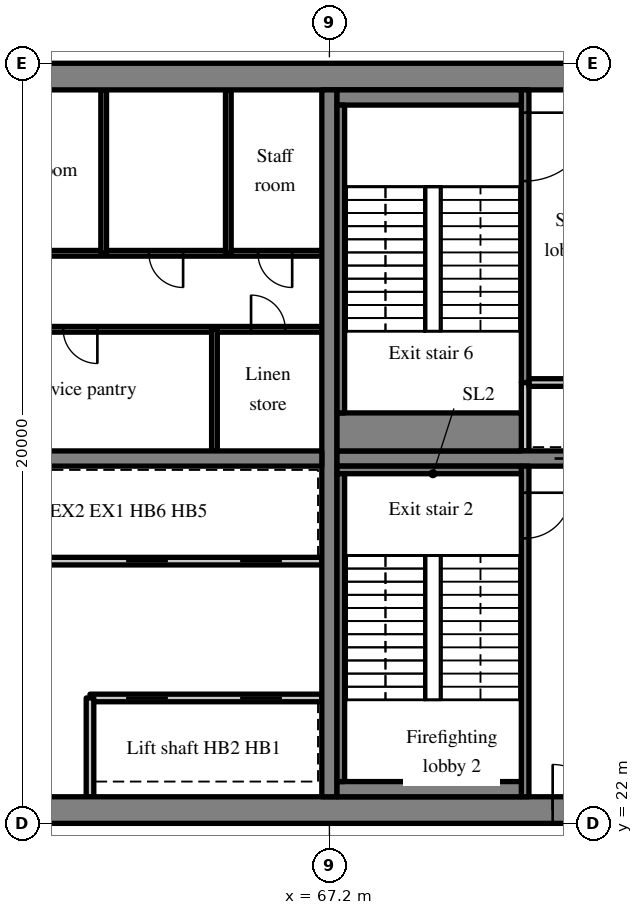
"""IFC4 building model, lengths in metres.
Left out: names, types, materials, properties, quantities, classifications, styles, units other than length and angle.
Written with IfcOpenShell. Run it as: python <this file> out.ifc"""

import sys

from ifc_helpers import new_model, si_unit, direction, frame, frame_2d, origin, place, context, subcontext, project, spatial, rectangle, extrude, source, transform, mapped, element, fill, save


model = new_model("IFC4")
c1 = context("Model", 3, precision=1e-05, world=origin(), true_north=direction((0.0, 1.0)))
c2 = subcontext(c1, "Body", "Model", "MODEL_VIEW")
j1 = project(units=[si_unit("LENGTHUNIT", "METRE"), si_unit("PLANEANGLEUNIT", "RADIAN")], contexts=[c1])
p1 = place(None, origin())
s1 = spatial("IfcSite", under=j1, at=p1, CompositionType="ELEMENT")
p2 = place(p1, origin())
s2 = spatial("IfcBuilding", under=s1, at=p2, CompositionType="ELEMENT")
p3 = place(p2, frame((0.0, 0.0, 166.8)))
s3 = spatial("IfcBuildingStorey", under=s2, at=p3, CompositionType="ELEMENT", Elevation=166.8)
m1 = source(origin(), c2, "Body", "SweptSolid", [
    extrude(rectangle(XDim=50.4, YDim=0.7, at=frame_2d((25.2, 0.0))), origin(), (0.0, 0.0, 1.0), 3.52),
])
p4 = place(p3, frame((25.2, 22.35, 0.0), z_axis=(0.0, 0.0, 1.0), x_axis=(1.0, 0.0, 0.0)))
e1 = element("IfcWall", 1, at=p4, inside=s3, PredefinedType="SHEAR", context=c2, shape_type="MappedRepresentation", body=[
    mapped(m1, transform((0.0, 0.0, 0.0), scale=1.0)),
])
m2 = source(origin(), c2, "Body", "SweptSolid", [
    extrude(rectangle(XDim=1.8, YDim=2.1, at=frame_2d((0.9, 1.05))), frame((0.0, 0.36, 0.0), z_axis=(0.0, -1.0, 0.0), x_axis=(1.0, 0.0, 0.0)), (0.0, 0.0, 1.0), 0.72),
])
p5 = place(p4, frame((15.9, 0.0, 0.0)))
e2 = element("IfcOpeningElement", 2, at=p5, cuts=e1, PredefinedType="OPENING", context=c2, shape_type="MappedRepresentation", body=[
    mapped(m2, transform((0.0, 0.0, 0.0), scale=1.0)),
])
m3 = source(origin(), c2, "Body", "SweptSolid", [
    extrude(rectangle(XDim=0.9, YDim=2.1, at=frame_2d((0.45, 1.05))), frame((0.0, 0.36, 0.0), z_axis=(0.0, -1.0, 0.0), x_axis=(1.0, 0.0, 0.0)), (0.0, 0.0, 1.0), 0.72),
])
p6 = place(p4, frame((9.7, 0.0, 0.0)))
e3 = element("IfcOpeningElement", 3, at=p6, cuts=e1, PredefinedType="OPENING", context=c2, shape_type="MappedRepresentation", body=[
    mapped(m3, transform((0.0, 0.0, 0.0), scale=1.0)),
])
p7 = place(p4, frame((21.5, 0.0, 0.0)))
e4 = element("IfcOpeningElement", 4, at=p7, cuts=e1, PredefinedType="OPENING", context=c2, shape_type="MappedRepresentation", body=[
    mapped(m3, transform((0.0, 0.0, 0.0), scale=1.0)),
])
p8 = place(p4, frame((32.7, 0.0, 0.0)))
e5 = element("IfcOpeningElement", 5, at=p8, cuts=e1, PredefinedType="OPENING", context=c2, shape_type="MappedRepresentation", body=[
    mapped(m2, transform((0.0, 0.0, 0.0), scale=1.0)),
])
m4 = source(origin(), c2, "Body", "SweptSolid", [
    extrude(rectangle(XDim=1.2, YDim=2.1, at=frame_2d((0.6, 1.05))), frame((0.0, 0.36, 0.0), z_axis=(0.0, -1.0, 0.0), x_axis=(1.0, 0.0, 0.0)), (0.0, 0.0, 1.0), 0.72),
])
p9 = place(p4, frame((6.475, 0.0, 0.0)))
e6 = element("IfcOpeningElement", 6, at=p9, cuts=e1, PredefinedType="OPENING", context=c2, shape_type="MappedRepresentation", body=[
    mapped(m4, transform((0.0, 0.0, 0.0), scale=1.0)),
])
p10 = place(p4, frame((47.875, 0.0, 0.0)))
e7 = element("IfcOpeningElement", 7, at=p10, cuts=e1, PredefinedType="OPENING", context=c2, shape_type="MappedRepresentation", body=[
    mapped(m4, transform((0.0, 0.0, 0.0), scale=1.0)),
])
p11 = place(p3, frame((25.2, 41.65, 0.0), z_axis=(0.0, 0.0, 1.0), x_axis=(1.0, 0.0, 0.0)))
e8 = element("IfcWall", 8, at=p11, inside=s3, PredefinedType="SHEAR", context=c2, shape_type="MappedRepresentation", body=[
    mapped(m1, transform((0.0, 0.0, 0.0), scale=1.0)),
])
m5 = source(origin(), c2, "Body", "SweptSolid", [
    extrude(rectangle(XDim=18.6, YDim=0.4, at=frame_2d((9.3, 0.0))), origin(), (0.0, 0.0, 1.0), 3.52),
])
p12 = place(p3, frame((67.2, 22.7, 0.0), z_axis=(0.0, 0.0, 1.0), x_axis=(0.0, 1.0, 0.0)))
e9 = element("IfcWall", 9, at=p12, inside=s3, PredefinedType="SHEAR", context=c2, shape_type="MappedRepresentation", body=[
    mapped(m5, transform((0.0, 0.0, 0.0), scale=1.0)),
])
m6 = source(origin(), c2, "Body", "SweptSolid", [
    extrude(rectangle(XDim=16.4, YDim=0.4, at=frame_2d((8.2, 0.0))), origin(), (0.0, 0.0, 1.0), 3.52),
])
p13 = place(p3, frame((50.6, 31.6, 0.0), z_axis=(0.0, 0.0, 1.0), x_axis=(1.0, 0.0, 0.0)))
e10 = element("IfcWall", 10, at=p13, inside=s3, PredefinedType="SHEAR", context=c2, shape_type="MappedRepresentation", body=[
    mapped(m6, transform((0.0, 0.0, 0.0), scale=1.0)),
])
m7 = source(origin(), c2, "Body", "SweptSolid", [
    extrude(rectangle(XDim=1.0, YDim=2.1, at=frame_2d((0.5, 1.05))), frame((0.0, 0.21, 0.0), z_axis=(0.0, -1.0, 0.0), x_axis=(1.0, 0.0, 0.0)), (0.0, 0.0, 1.0), 0.42),
])
p14 = place(p13, frame((0.6, 0.0, 0.0)))
e11 = element("IfcOpeningElement", 11, at=p14, cuts=e10, PredefinedType="OPENING", context=c2, shape_type="MappedRepresentation", body=[
    mapped(m7, transform((0.0, 0.0, 0.0), scale=1.0)),
])
m8 = source(origin(), c2, "Body", "SweptSolid", [
    extrude(rectangle(XDim=7.5, YDim=0.4, at=frame_2d((3.75, 0.0))), origin(), (0.0, 0.0, 1.0), 3.52),
])
p15 = place(p3, frame((67.4, 31.6, 0.0), z_axis=(0.0, 0.0, 1.0), x_axis=(1.0, 0.0, 0.0)))
e12 = element("IfcWall", 12, at=p15, inside=s3, PredefinedType="SHEAR", context=c2, shape_type="MappedRepresentation", body=[
    mapped(m8, transform((0.0, 0.0, 0.0), scale=1.0)),
])
m9 = source(origin(), c2, "Body", "SweptSolid", [
    extrude(rectangle(XDim=1.1, YDim=2.1, at=frame_2d((0.55, 1.05))), frame((0.0, 0.21, 0.0), z_axis=(0.0, -1.0, 0.0), x_axis=(1.0, 0.0, 0.0)), (0.0, 0.0, 1.0), 0.42),
])
p16 = place(p15, frame((5.725, 0.0, 0.0)))
e13 = element("IfcOpeningElement", 13, at=p16, cuts=e12, PredefinedType="OPENING", context=c2, shape_type="MappedRepresentation", body=[
    mapped(m9, transform((0.0, 0.0, 0.0), scale=1.0)),
])
m10 = source(origin(), c2, "Body", "SweptSolid", [
    extrude(rectangle(XDim=6.1, YDim=0.2, at=frame_2d((3.05, 0.0))), origin(), (0.0, 0.0, 1.0), 3.52),
])
p17 = place(p3, frame((67.0, 25.3, 0.0), z_axis=(0.0, 0.0, 1.0), x_axis=(-1.0, 0.0, 0.0)))
e14 = element("IfcWall", 14, at=p17, inside=s3, PredefinedType="SOLIDWALL", context=c2, shape_type="MappedRepresentation", body=[
    mapped(m10, transform((0.0, 0.0, 0.0), scale=1.0)),
])
m11 = source(origin(), c2, "Body", "SweptSolid", [
    extrude(rectangle(XDim=1.1, YDim=2.1, at=frame_2d((0.55, 1.05))), frame((0.0, 0.11, 0.0), z_axis=(0.0, -1.0, 0.0), x_axis=(1.0, 0.0, 0.0)), (0.0, 0.0, 1.0), 0.22),
])
p18 = place(p17, frame((1.05, 0.0, 0.0)))
e15 = element("IfcOpeningElement", 15, at=p18, cuts=e14, PredefinedType="OPENING", context=c2, shape_type="MappedRepresentation", body=[
    mapped(m11, transform((0.0, 0.0, 0.0), scale=1.0)),
])
p19 = place(p17, frame((4.05, 0.0, 0.0)))
e16 = element("IfcOpeningElement", 16, at=p19, cuts=e14, PredefinedType="OPENING", context=c2, shape_type="MappedRepresentation", body=[
    mapped(m11, transform((0.0, 0.0, 0.0), scale=1.0)),
])
m12 = source(origin(), c2, "Body", "SweptSolid", [
    extrude(rectangle(XDim=12.1, YDim=0.2, at=frame_2d((6.05, 0.0))), origin(), (0.0, 0.0, 1.0), 3.52),
])
p20 = place(p3, frame((67.0, 28.9, 0.0), z_axis=(0.0, 0.0, 1.0), x_axis=(-1.0, 0.0, 0.0)))
e17 = element("IfcWall", 17, at=p20, inside=s3, PredefinedType="SOLIDWALL", context=c2, shape_type="MappedRepresentation", body=[
    mapped(m12, transform((0.0, 0.0, 0.0), scale=1.0)),
])
p21 = place(p20, frame((1.05, 0.0, 0.0)))
e18 = element("IfcOpeningElement", 18, at=p21, cuts=e17, PredefinedType="OPENING", context=c2, shape_type="MappedRepresentation", body=[
    mapped(m11, transform((0.0, 0.0, 0.0), scale=1.0)),
])
p22 = place(p20, frame((4.05, 0.0, 0.0)))
e19 = element("IfcOpeningElement", 19, at=p22, cuts=e17, PredefinedType="OPENING", context=c2, shape_type="MappedRepresentation", body=[
    mapped(m11, transform((0.0, 0.0, 0.0), scale=1.0)),
])
m13 = source(origin(), c2, "Body", "SweptSolid", [
    extrude(rectangle(XDim=2.6, YDim=0.2, at=frame_2d((1.3, 0.0))), origin(), (0.0, 0.0, 1.0), 3.52),
])
p23 = place(p3, frame((60.9, 22.7, 0.0), z_axis=(0.0, 0.0, 1.0), x_axis=(0.0, 1.0, 0.0)))
e20 = element("IfcWall", 20, at=p23, inside=s3, PredefinedType="SOLIDWALL", context=c2, shape_type="MappedRepresentation", body=[
    mapped(m13, transform((0.0, 0.0, 0.0), scale=1.0)),
])
m14 = source(origin(), c2, "Body", "SweptSolid", [
    extrude(rectangle(XDim=14.2, YDim=0.15, at=frame_2d((7.1, 0.0))), origin(), (0.0, 0.0, 1.0), 3.52),
])
p24 = place(p3, frame((67.0, 35.0, 0.0), z_axis=(0.0, 0.0, 1.0), x_axis=(-1.0, 0.0, 0.0)))
e21 = element("IfcWall", 21, at=p24, inside=s3, PredefinedType="PARTITIONING", context=c2, shape_type="MappedRepresentation", body=[
    mapped(m14, transform((0.0, 0.0, 0.0), scale=1.0)),
])
m15 = source(origin(), c2, "Body", "SweptSolid", [
    extrude(rectangle(XDim=0.9, YDim=2.1, at=frame_2d((0.45, 1.05))), frame((0.0, 0.085, 0.0), z_axis=(0.0, -1.0, 0.0), x_axis=(1.0, 0.0, 0.0)), (0.0, 0.0, 1.0), 0.17),
])
p25 = place(p24, frame((0.962, 0.0, 0.0)))
e22 = element("IfcOpeningElement", 22, at=p25, cuts=e21, PredefinedType="OPENING", context=c2, shape_type="MappedRepresentation", body=[
    mapped(m15, transform((0.0, 0.0, 0.0), scale=1.0)),
])
p26 = place(p24, frame((5.906, 0.0, 0.0)))
e23 = element("IfcOpeningElement", 23, at=p26, cuts=e21, PredefinedType="OPENING", context=c2, shape_type="MappedRepresentation", body=[
    mapped(m15, transform((0.0, 0.0, 0.0), scale=1.0)),
])
p27 = place(p24, frame((11.556, 0.0, 0.0)))
e24 = element("IfcOpeningElement", 24, at=p27, cuts=e21, PredefinedType="OPENING", context=c2, shape_type="MappedRepresentation", body=[
    mapped(m15, transform((0.0, 0.0, 0.0), scale=1.0)),
])
m16 = source(origin(), c2, "Body", "SweptSolid", [
    extrude(rectangle(XDim=16.4, YDim=0.15, at=frame_2d((8.2, 0.0))), origin(), (0.0, 0.0, 1.0), 3.52),
])
p28 = place(p3, frame((67.0, 37.0, 0.0), z_axis=(0.0, 0.0, 1.0), x_axis=(-1.0, 0.0, 0.0)))
e25 = element("IfcWall", 25, at=p28, inside=s3, PredefinedType="PARTITIONING", context=c2, shape_type="MappedRepresentation", body=[
    mapped(m16, transform((0.0, 0.0, 0.0), scale=1.0)),
])
p29 = place(p28, frame((0.78, 0.0, 0.0)))
e26 = element("IfcOpeningElement", 26, at=p29, cuts=e25, PredefinedType="OPENING", context=c2, shape_type="MappedRepresentation", body=[
    mapped(m15, transform((0.0, 0.0, 0.0), scale=1.0)),
])
p30 = place(p28, frame((3.65, 0.0, 0.0)))
e27 = element("IfcOpeningElement", 27, at=p30, cuts=e25, PredefinedType="OPENING", context=c2, shape_type="MappedRepresentation", body=[
    mapped(m15, transform((0.0, 0.0, 0.0), scale=1.0)),
])
p31 = place(p28, frame((9.39, 0.0, 0.0)))
e28 = element("IfcOpeningElement", 28, at=p31, cuts=e25, PredefinedType="OPENING", context=c2, shape_type="MappedRepresentation", body=[
    mapped(m15, transform((0.0, 0.0, 0.0), scale=1.0)),
])
p32 = place(p28, frame((14.72, 0.0, 0.0)))
e29 = element("IfcOpeningElement", 29, at=p32, cuts=e25, PredefinedType="OPENING", context=c2, shape_type="MappedRepresentation", body=[
    mapped(m15, transform((0.0, 0.0, 0.0), scale=1.0)),
])
m17 = source(origin(), c2, "Body", "SweptSolid", [
    extrude(rectangle(XDim=3.2, YDim=0.15, at=frame_2d((1.6, 0.0))), origin(), (0.0, 0.0, 1.0), 3.52),
])
p33 = place(p3, frame((64.175, 31.8, 0.0), z_axis=(0.0, 0.0, 1.0), x_axis=(0.0, 1.0, 0.0)))
e30 = element("IfcWall", 30, at=p33, inside=s3, PredefinedType="PARTITIONING", context=c2, shape_type="MappedRepresentation", body=[
    mapped(m17, transform((0.0, 0.0, 0.0), scale=1.0)),
])
m18 = source(origin(), c2, "Body", "SweptSolid", [
    extrude(rectangle(XDim=4.3, YDim=0.15, at=frame_2d((2.15, 0.0))), origin(), (0.0, 0.0, 1.0), 3.52),
])
for number, where, z_axis, x_axis in (
    (31, (64.54, 37.0, 0.0), (0.0, 0.0, 1.0), (0.0, 1.0, 0.0)),
    (32, (61.26, 37.0, 0.0), (0.0, 0.0, 1.0), (0.0, 1.0, 0.0)),
):
    element("IfcWall", number, at=place(p3, frame(where, z_axis=z_axis, x_axis=x_axis)), inside=s3, PredefinedType="PARTITIONING", context=c2, shape_type="MappedRepresentation", body=[
        mapped(m18, transform((0.0, 0.0, 0.0), scale=1.0)),
    ])
m19 = source(origin(), c2, "Body", "SweptSolid", [
    extrude(rectangle(XDim=8.7, YDim=0.2, at=frame_2d((4.35, 0.0))), origin(), (0.0, 0.0, 1.0), 3.52),
])
p34 = place(p3, frame((72.35, 22.7, 0.0), z_axis=(0.0, 0.0, 1.0), x_axis=(0.0, 1.0, 0.0)))
e33 = element("IfcWall", 33, at=p34, inside=s3, PredefinedType="SOLIDWALL", context=c2, shape_type="MappedRepresentation", body=[
    mapped(m19, transform((0.0, 0.0, 0.0), scale=1.0)),
])
m20 = source(origin(), c2, "Body", "SweptSolid", [
    extrude(rectangle(XDim=1.2, YDim=2.1, at=frame_2d((0.6, 1.05))), frame((0.0, 0.11, 0.0), z_axis=(0.0, -1.0, 0.0), x_axis=(1.0, 0.0, 0.0)), (0.0, 0.0, 1.0), 0.22),
])
p35 = place(p34, frame((6.8, 0.0, 0.0)))
e34 = element("IfcOpeningElement", 34, at=p35, cuts=e33, PredefinedType="OPENING", context=c2, shape_type="MappedRepresentation", body=[
    mapped(m20, transform((0.0, 0.0, 0.0), scale=1.0)),
])
m21 = source(origin(), c2, "Body", "SweptSolid", [
    extrude(rectangle(XDim=1.8, YDim=0.2, at=frame_2d((0.9, 0.0))), origin(), (0.0, 0.0, 1.0), 3.52),
])
p36 = place(p3, frame((72.35, 31.8, 0.0), z_axis=(0.0, 0.0, 1.0), x_axis=(0.0, 1.0, 0.0)))
e35 = element("IfcWall", 35, at=p36, inside=s3, PredefinedType="SOLIDWALL", context=c2, shape_type="MappedRepresentation", body=[
    mapped(m21, transform((0.0, 0.0, 0.0), scale=1.0)),
])
m22 = source(origin(), c2, "Body", "SweptSolid", [
    extrude(rectangle(XDim=2.45, YDim=0.2, at=frame_2d((1.225, 0.0))), origin(), (0.0, 0.0, 1.0), 3.52),
])
p37 = place(p3, frame((72.45, 33.6, 0.0), z_axis=(0.0, 0.0, 1.0), x_axis=(1.0, 0.0, 0.0)))
e36 = element("IfcWall", 36, at=p37, inside=s3, PredefinedType="SOLIDWALL", context=c2, shape_type="MappedRepresentation", body=[
    mapped(m22, transform((0.0, 0.0, 0.0), scale=1.0)),
])
m23 = source(origin(), c2, "Body", "SweptSolid", [
    extrude(rectangle(XDim=7.7, YDim=0.2, at=frame_2d((3.85, 0.0))), origin(), (0.0, 0.0, 1.0), 3.52),
])
p38 = place(p3, frame((72.35, 33.6, 0.0), z_axis=(0.0, 0.0, 1.0), x_axis=(0.0, 1.0, 0.0)))
e37 = element("IfcWall", 37, at=p38, inside=s3, PredefinedType="SOLIDWALL", context=c2, shape_type="MappedRepresentation", body=[
    mapped(m23, transform((0.0, 0.0, 0.0), scale=1.0)),
])
m24 = source(origin(), c2, "Body", "SweptSolid", [
    extrude(rectangle(XDim=1.8, YDim=2.1, at=frame_2d((0.9, 1.05))), frame((0.0, 0.11, 0.0), z_axis=(0.0, -1.0, 0.0), x_axis=(1.0, 0.0, 0.0)), (0.0, 0.0, 1.0), 0.22),
])
p39 = place(p38, frame((5.3, 0.0, 0.0)))
e38 = element("IfcOpeningElement", 38, at=p39, cuts=e37, PredefinedType="OPENING", context=c2, shape_type="MappedRepresentation", body=[
    mapped(m24, transform((0.0, 0.0, 0.0), scale=1.0)),
])
m25 = source(origin(), c2, "Body", "SweptSolid", [
    extrude(rectangle(XDim=4.85, YDim=0.4, at=frame_2d((2.425, 0.0))), origin(), (0.0, 0.0, 1.0), 3.52),
])
p40 = place(p3, frame((67.4, 22.9, 0.0), z_axis=(0.0, 0.0, 1.0), x_axis=(1.0, 0.0, 0.0)))
e39 = element("IfcWall", 39, at=p40, inside=s3, PredefinedType="SOLIDWALL", context=c2, shape_type="MappedRepresentation", body=[
    mapped(m25, transform((0.0, 0.0, 0.0), scale=1.0)),
])
m26 = source(origin(), c2, "Body", "SweptSolid", [
    extrude(rectangle(XDim=4.85, YDim=0.2, at=frame_2d((2.425, 0.0))), origin(), (0.0, 0.0, 1.0), 3.52),
])
p41 = place(p3, frame((67.4, 31.3, 0.0), z_axis=(0.0, 0.0, 1.0), x_axis=(1.0, 0.0, 0.0)))
e40 = element("IfcWall", 40, at=p41, inside=s3, PredefinedType="SOLIDWALL", context=c2, shape_type="MappedRepresentation", body=[
    mapped(m26, transform((0.0, 0.0, 0.0), scale=1.0)),
])
m27 = source(origin(), c2, "Body", "SweptSolid", [
    extrude(rectangle(XDim=8.1, YDim=0.2, at=frame_2d((4.05, 0.0))), origin(), (0.0, 0.0, 1.0), 3.52),
])
p42 = place(p3, frame((67.5, 23.1, 0.0), z_axis=(0.0, 0.0, 1.0), x_axis=(0.0, 1.0, 0.0)))
e41 = element("IfcWall", 41, at=p42, inside=s3, PredefinedType="SOLIDWALL", context=c2, shape_type="MappedRepresentation", body=[
    mapped(m27, transform((0.0, 0.0, 0.0), scale=1.0)),
])
p43 = place(p3, frame((67.4, 41.1, 0.0), z_axis=(0.0, 0.0, 1.0), x_axis=(1.0, 0.0, 0.0)))
e42 = element("IfcWall", 42, at=p43, inside=s3, PredefinedType="SOLIDWALL", context=c2, shape_type="MappedRepresentation", body=[
    mapped(m25, transform((0.0, 0.0, 0.0), scale=1.0)),
])
m28 = source(origin(), c2, "Body", "SweptSolid", [
    extrude(rectangle(XDim=4.85, YDim=1.0, at=frame_2d((2.425, 0.0))), origin(), (0.0, 0.0, 1.0), 3.52),
])
p44 = place(p3, frame((67.4, 32.3, 0.0), z_axis=(0.0, 0.0, 1.0), x_axis=(1.0, 0.0, 0.0)))
e43 = element("IfcWall", 43, at=p44, inside=s3, PredefinedType="SOLIDWALL", context=c2, shape_type="MappedRepresentation", body=[
    mapped(m28, transform((0.0, 0.0, 0.0), scale=1.0)),
])
p45 = place(p3, frame((67.5, 32.8, 0.0), z_axis=(0.0, 0.0, 1.0), x_axis=(0.0, 1.0, 0.0)))
e44 = element("IfcWall", 44, at=p45, inside=s3, PredefinedType="SOLIDWALL", context=c2, shape_type="MappedRepresentation", body=[
    mapped(m27, transform((0.0, 0.0, 0.0), scale=1.0)),
])
m29 = source(origin(), c2, "Body", "SweptSolid", [
    extrude(rectangle(XDim=1.1, YDim=2.1, at=frame_2d((0.55, 1.05))), frame((0.0, 0.025, 0.0), z_axis=(0.0, -1.0, 0.0), x_axis=(1.0, 0.0, 0.0)), (0.0, 0.0, 1.0), 0.05),
])
p46 = place(p18, origin())
e45 = element("IfcDoor", 45, at=p46, inside=s3, OperationType="SLIDING_TO_RIGHT", PredefinedType="DOOR", context=c2, shape_type="MappedRepresentation", body=[
    mapped(m29, transform((0.0, 0.0, 0.0), scale=1.0)),
])
fill(e15, e45)
p47 = place(p19, origin())
e46 = element("IfcDoor", 46, at=p47, inside=s3, OperationType="SLIDING_TO_LEFT", PredefinedType="DOOR", context=c2, shape_type="MappedRepresentation", body=[
    mapped(m29, transform((0.0, 0.0, 0.0), scale=1.0)),
])
fill(e16, e46)
p48 = place(p21, origin())
e47 = element("IfcDoor", 47, at=p48, inside=s3, OperationType="SLIDING_TO_RIGHT", PredefinedType="DOOR", context=c2, shape_type="MappedRepresentation", body=[
    mapped(m29, transform((0.0, 0.0, 0.0), scale=1.0)),
])
fill(e18, e47)
p49 = place(p22, origin())
e48 = element("IfcDoor", 48, at=p49, inside=s3, OperationType="SLIDING_TO_LEFT", PredefinedType="DOOR", context=c2, shape_type="MappedRepresentation", body=[
    mapped(m29, transform((0.0, 0.0, 0.0), scale=1.0)),
])
fill(e19, e48)
m30 = source(origin(), c2, "Body", "SweptSolid", [
    extrude(rectangle(XDim=0.9, YDim=2.1, at=frame_2d((0.45, 1.05))), frame((0.0, 0.025, 0.0), z_axis=(0.0, -1.0, 0.0), x_axis=(1.0, 0.0, 0.0)), (0.0, 0.0, 1.0), 0.05),
])
p50 = place(p25, origin())
e49 = element("IfcDoor", 49, at=p50, inside=s3, OperationType="SINGLE_SWING_RIGHT", PredefinedType="DOOR", context=c2, shape_type="MappedRepresentation", body=[
    mapped(m30, transform((0.0, 0.0, 0.0), scale=1.0)),
])
fill(e22, e49)
p51 = place(p26, origin())
e50 = element("IfcDoor", 50, at=p51, inside=s3, OperationType="SINGLE_SWING_LEFT", PredefinedType="DOOR", context=c2, shape_type="MappedRepresentation", body=[
    mapped(m30, transform((0.0, 0.0, 0.0), scale=1.0)),
])
fill(e23, e50)
p52 = place(p29, origin())
e51 = element("IfcDoor", 51, at=p52, inside=s3, OperationType="SINGLE_SWING_LEFT", PredefinedType="DOOR", context=c2, shape_type="MappedRepresentation", body=[
    mapped(m30, transform((0.0, 0.0, 0.0), scale=1.0)),
])
fill(e26, e51)
p53 = place(p30, origin())
e52 = element("IfcDoor", 52, at=p53, inside=s3, OperationType="SINGLE_SWING_LEFT", PredefinedType="DOOR", context=c2, shape_type="MappedRepresentation", body=[
    mapped(m30, transform((0.0, 0.0, 0.0), scale=1.0)),
])
fill(e27, e52)
m31 = source(origin(), c2, "Body", "SweptSolid", [
    extrude(rectangle(XDim=1.2, YDim=2.1, at=frame_2d((0.6, 1.05))), frame((0.0, 0.025, 0.0), z_axis=(0.0, -1.0, 0.0), x_axis=(1.0, 0.0, 0.0)), (0.0, 0.0, 1.0), 0.05),
])
p54 = place(p35, origin())
e53 = element("IfcDoor", 53, at=p54, inside=s3, OperationType="SINGLE_SWING_RIGHT", PredefinedType="DOOR", context=c2, shape_type="MappedRepresentation", body=[
    mapped(m31, transform((0.0, 0.0, 0.0), scale=1.0)),
])
fill(e34, e53)
m32 = source(origin(), c2, "Body", "SweptSolid", [
    extrude(rectangle(XDim=1.2, YDim=2.1, at=frame_2d((0.6, 1.05))), frame((0.0, 0.275, 0.0), z_axis=(0.0, -1.0, 0.0), x_axis=(1.0, 0.0, 0.0)), (0.0, 0.0, 1.0), 0.05),
])
p55 = place(p10, origin())
e54 = element("IfcDoor", 54, at=p55, inside=s3, OperationType="SINGLE_SWING_LEFT", PredefinedType="DOOR", context=c2, shape_type="MappedRepresentation", body=[
    mapped(m32, transform((0.0, 0.0, 0.0), scale=1.0)),
])
fill(e7, e54)
p56 = place(p16, origin())
e55 = element("IfcDoor", 55, at=p56, inside=s3, OperationType="SLIDING_TO_LEFT", PredefinedType="DOOR", context=c2, shape_type="MappedRepresentation", body=[
    mapped(m29, transform((0.0, 0.0, 0.0), scale=1.0)),
])
fill(e13, e55)
m33 = source(origin(), c2, "Body", "SweptSolid", [
    extrude(rectangle(XDim=1.8, YDim=2.1, at=frame_2d((0.9, 1.05))), frame((0.0, 0.025, 0.0), z_axis=(0.0, -1.0, 0.0), x_axis=(1.0, 0.0, 0.0)), (0.0, 0.0, 1.0), 0.05),
])
p57 = place(p39, origin())
e56 = element("IfcDoor", 56, at=p57, inside=s3, OperationType="SINGLE_SWING_RIGHT", PredefinedType="DOOR", context=c2, shape_type="MappedRepresentation", body=[
    mapped(m33, transform((0.0, 0.0, 0.0), scale=1.0)),
])
fill(e38, e56)
save(model, sys.argv[1])
